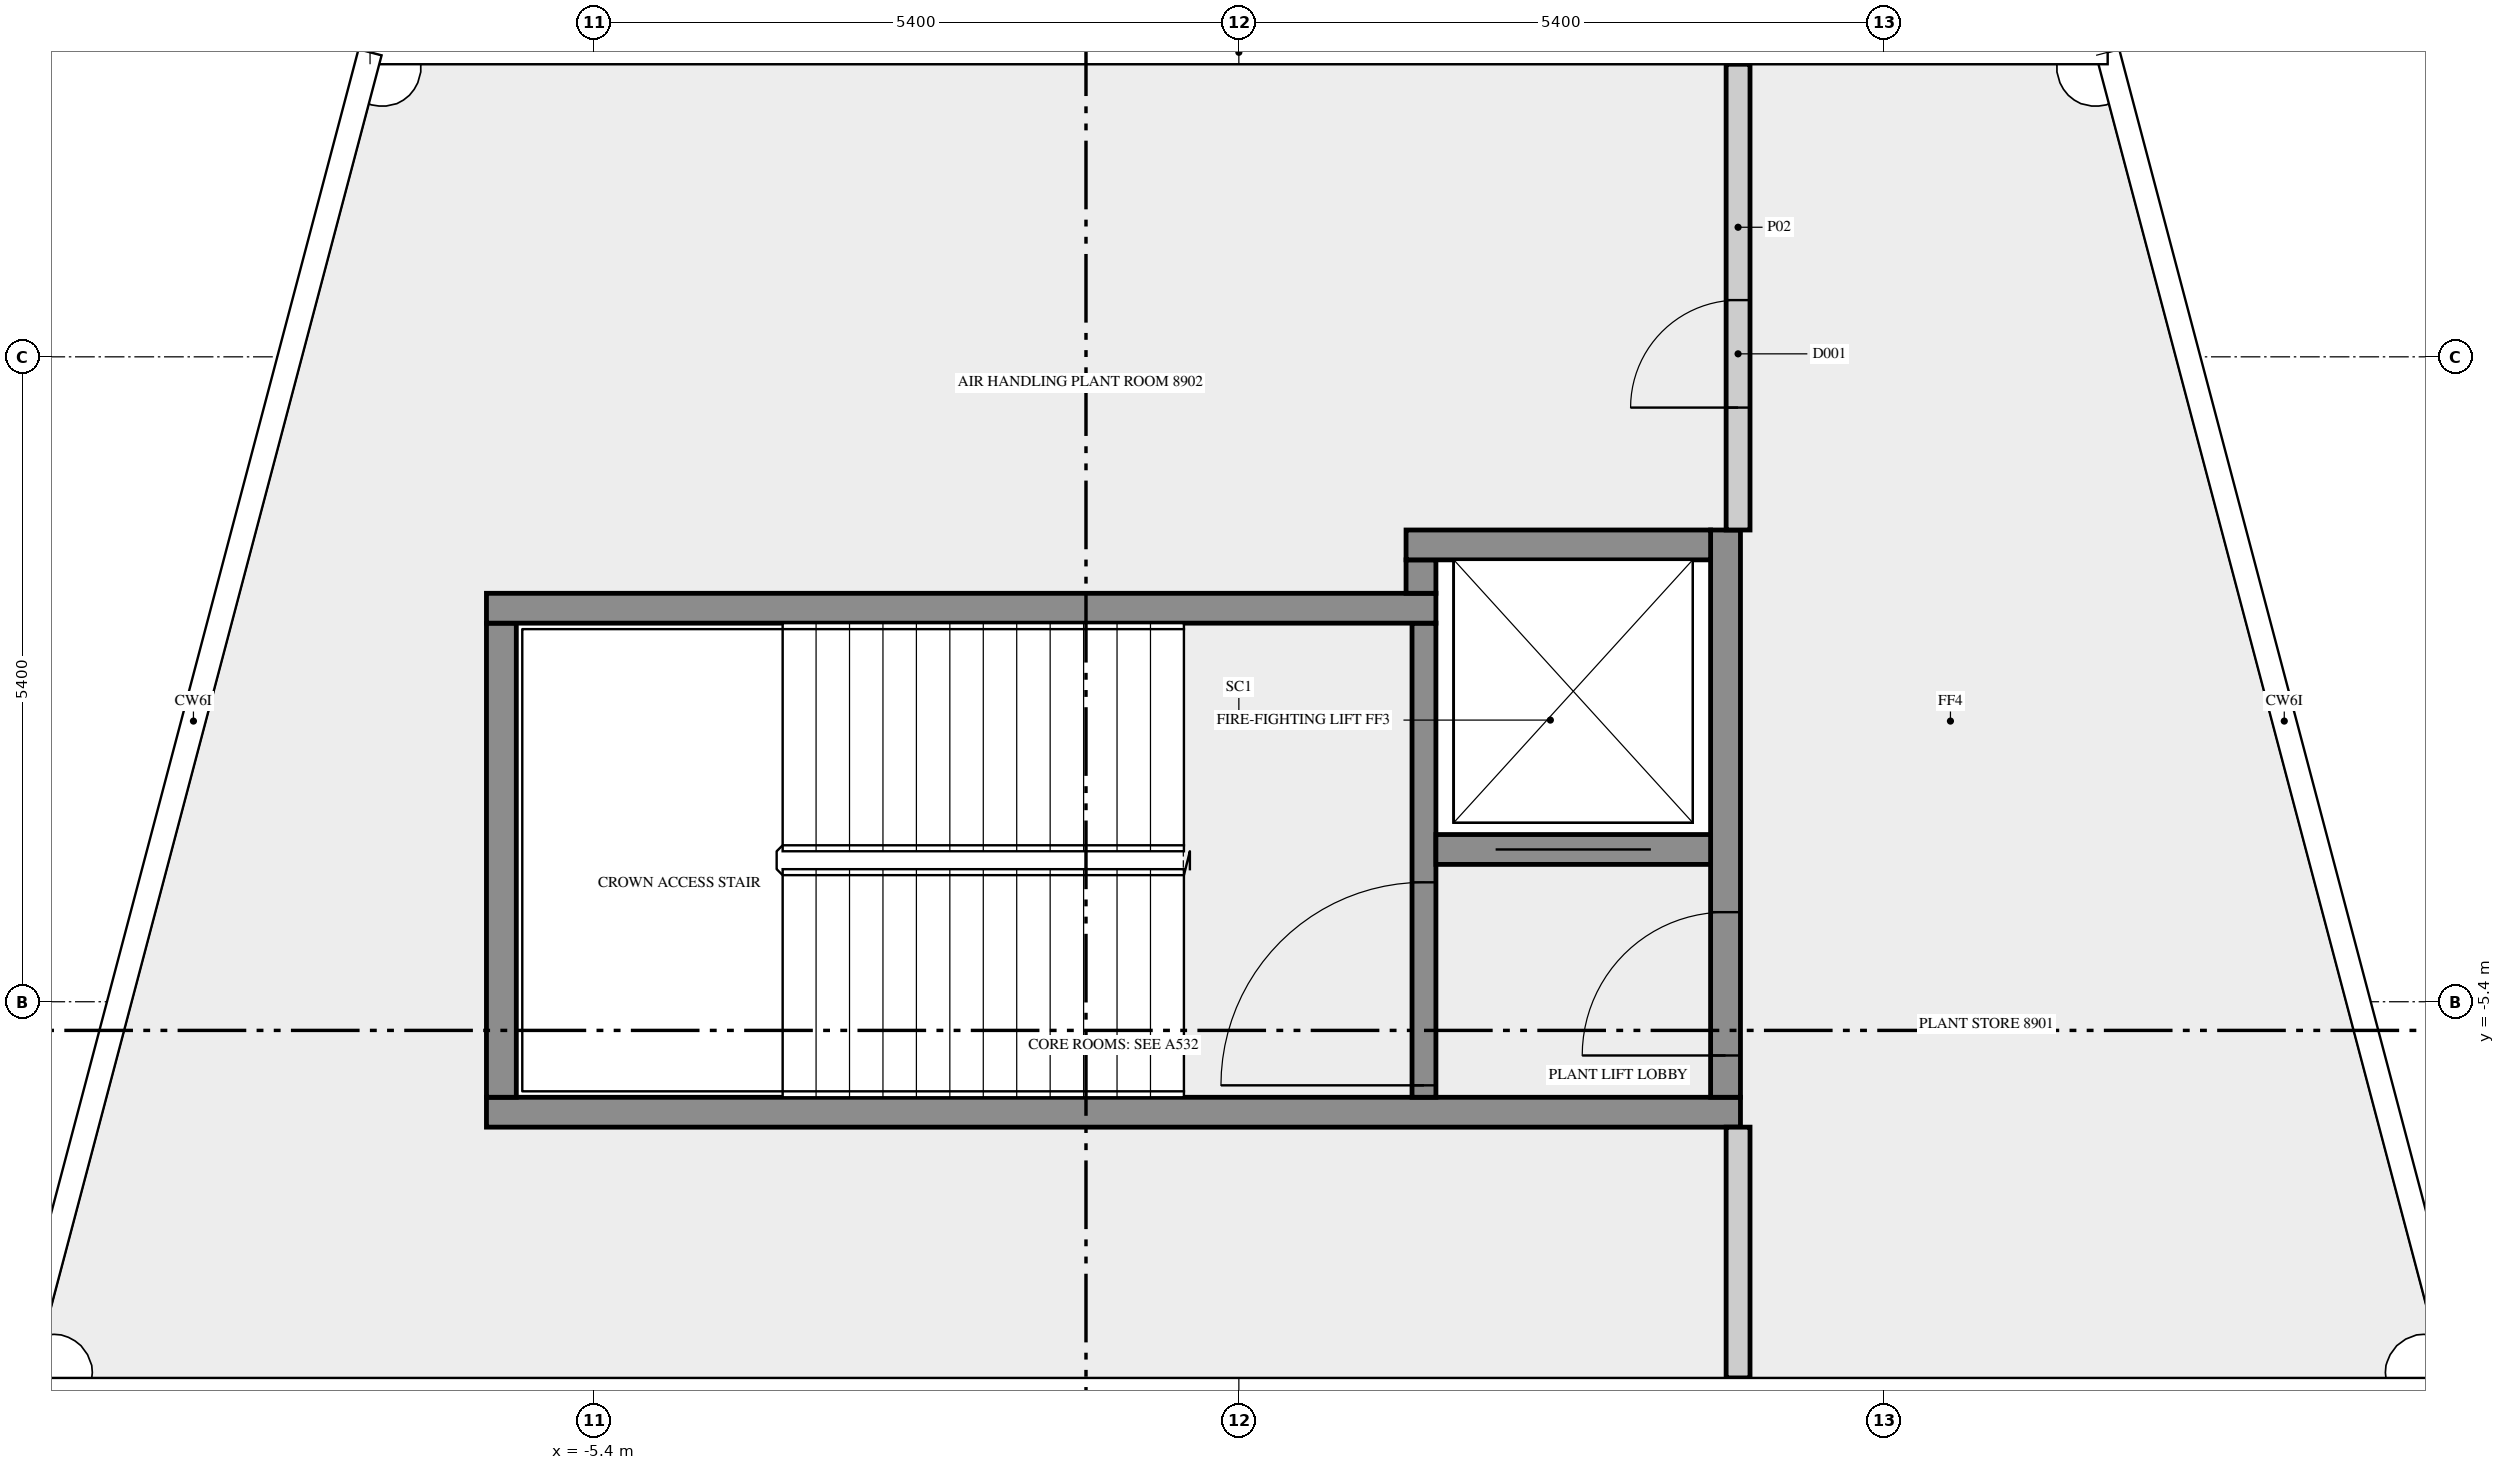
"""IFC4 building model, lengths in metres.
Left out: names, types, materials, properties, quantities, classifications, styles, units other than length and angle.
Written with IfcOpenShell. Run it as: python <this file> out.ifc"""

import sys

from ifc_helpers import new_model, si_unit, direction, frame, frame_2d, origin, place, context, subcontext, project, spatial, rectangle, extrude, element, fill, save


model = new_model("IFC4")
c1 = context("Model", 3, precision=1e-05, world=origin(), true_north=direction((0.0, 1.0)))
c2 = subcontext(c1, "Body", "Model", "MODEL_VIEW")
j1 = project(units=[si_unit("LENGTHUNIT", "METRE"), si_unit("PLANEANGLEUNIT", "RADIAN")], contexts=[c1])
p1 = place(None, origin())
s1 = spatial("IfcSite", under=j1, at=p1, CompositionType="ELEMENT")
p2 = place(p1, origin())
s2 = spatial("IfcBuilding", under=s1, at=p2, CompositionType="ELEMENT")
p3 = place(p2, frame((0.0, 0.0, 384.0)))
s3 = spatial("IfcBuildingStorey", under=s2, at=p3, CompositionType="ELEMENT", Elevation=384.0)
p4 = place(p3, frame((-6.3, -6.325, 0.0), z_axis=(0.0, 0.0, 1.0), x_axis=(1.0, 0.0, 0.0)))
e1 = element("IfcWall", 1, at=p4, inside=s3, PredefinedType="SHEAR", context=c2, shape_type="SweptSolid", body=[
    extrude(rectangle(XDim=10.5, YDim=0.25, at=frame_2d((5.25, 0.0))), origin(), (0.0, 0.0, 1.0), 3.75),
])
p5 = place(p3, frame((-6.175, -6.2, 0.0), z_axis=(0.0, 0.0, 1.0), x_axis=(0.0, 1.0, 0.0)))
e2 = element("IfcWall", 2, at=p5, inside=s3, PredefinedType="SHEAR", context=c2, shape_type="SweptSolid", body=[
    extrude(rectangle(XDim=3.97, YDim=0.25, at=frame_2d((1.985, 0.0))), origin(), (0.0, 0.0, 1.0), 3.75),
])
p6 = place(p3, frame((1.55, -6.2, 0.0), z_axis=(0.0, 0.0, 1.0), x_axis=(0.0, 1.0, 0.0)))
e3 = element("IfcWall", 3, at=p6, inside=s3, PredefinedType="SHEAR", context=c2, shape_type="SweptSolid", body=[
    extrude(rectangle(XDim=3.97, YDim=0.2, at=frame_2d((1.985, 0.0))), origin(), (0.0, 0.0, 1.0), 3.75),
])
p7 = place(p6, frame((0.1, 0.0, 0.0)))
e4 = element("IfcOpeningElement", 4, at=p7, cuts=e3, PredefinedType="OPENING", context=c2, shape_type="SweptSolid", body=[
    extrude(rectangle(XDim=1.7, YDim=2.1, at=frame_2d((0.85, 1.05))), frame((0.0, 0.11, 0.0), z_axis=(0.0, -1.0, 0.0), x_axis=(1.0, 0.0, 0.0)), (0.0, 0.0, 1.0), 0.22),
])
p8 = place(p3, frame((4.075, -6.2, 0.0), z_axis=(0.0, 0.0, 1.0), x_axis=(0.0, 1.0, 0.0)))
e5 = element("IfcWall", 5, at=p8, inside=s3, PredefinedType="SHEAR", context=c2, shape_type="SweptSolid", body=[
    extrude(rectangle(XDim=4.75, YDim=0.25, at=frame_2d((2.375, 0.0))), origin(), (0.0, 0.0, 1.0), 3.75),
])
p9 = place(p8, frame((0.35, 0.0, 0.0)))
e6 = element("IfcOpeningElement", 6, at=p9, cuts=e5, PredefinedType="OPENING", context=c2, shape_type="SweptSolid", body=[
    extrude(rectangle(XDim=1.2, YDim=2.1, at=frame_2d((0.6, 1.05))), frame((0.0, 0.135, 0.0), z_axis=(0.0, -1.0, 0.0), x_axis=(1.0, 0.0, 0.0)), (0.0, 0.0, 1.0), 0.27),
])
p10 = place(p3, frame((1.65, -4.125, 0.0), z_axis=(0.0, 0.0, 1.0), x_axis=(1.0, 0.0, 0.0)))
e7 = element("IfcWall", 7, at=p10, inside=s3, PredefinedType="SHEAR", context=c2, shape_type="SweptSolid", body=[
    extrude(rectangle(XDim=2.3, YDim=0.25, at=frame_2d((1.15, 0.0))), origin(), (0.0, 0.0, 1.0), 3.75),
])
p11 = place(p10, frame((0.5, 0.0, 0.0)))
e8 = element("IfcOpeningElement", 8, at=p11, cuts=e7, PredefinedType="OPENING", context=c2, shape_type="SweptSolid", body=[
    extrude(rectangle(XDim=1.3, YDim=2.1, at=frame_2d((0.65, 1.05))), frame((0.0, 0.135, 0.0), z_axis=(0.0, -1.0, 0.0), x_axis=(1.0, 0.0, 0.0)), (0.0, 0.0, 1.0), 0.27),
])
p12 = place(p3, frame((-6.3, -2.105, 0.0), z_axis=(0.0, 0.0, 1.0), x_axis=(1.0, 0.0, 0.0)))
e9 = element("IfcWall", 9, at=p12, inside=s3, PredefinedType="SHEAR", context=c2, shape_type="SweptSolid", body=[
    extrude(rectangle(XDim=7.95, YDim=0.25, at=frame_2d((3.975, 0.0))), origin(), (0.0, 0.0, 1.0), 3.75),
])
p13 = place(p3, frame((1.525, -1.98, 0.0), z_axis=(0.0, 0.0, 1.0), x_axis=(0.0, 1.0, 0.0)))
e10 = element("IfcWall", 10, at=p13, inside=s3, PredefinedType="SHEAR", context=c2, shape_type="SweptSolid", body=[
    extrude(rectangle(XDim=0.28, YDim=0.25, at=frame_2d((0.14, 0.0))), origin(), (0.0, 0.0, 1.0), 3.75),
])
p14 = place(p3, frame((1.4, -1.575, 0.0), z_axis=(0.0, 0.0, 1.0), x_axis=(1.0, 0.0, 0.0)))
e11 = element("IfcWall", 11, at=p14, inside=s3, PredefinedType="SHEAR", context=c2, shape_type="SweptSolid", body=[
    extrude(rectangle(XDim=2.55, YDim=0.25, at=frame_2d((1.275, 0.0))), origin(), (0.0, 0.0, 1.0), 3.75),
])
p15 = place(p3, frame((4.18, -8.55, 0.0), z_axis=(0.0, 0.0, 1.0), x_axis=(0.0, 1.0, 0.0)))
e12 = element("IfcWall", 12, at=p15, inside=s3, PredefinedType="SOLIDWALL", context=c2, shape_type="SweptSolid", body=[
    extrude(rectangle(XDim=2.1, YDim=0.2, at=frame_2d((1.05, 0.0))), origin(), (0.0, 0.0, 1.0), 2.838),
])
p16 = place(p3, frame((4.18, -1.45, 0.0), z_axis=(0.0, 0.0, 1.0), x_axis=(0.0, 1.0, 0.0)))
e13 = element("IfcWall", 13, at=p16, inside=s3, PredefinedType="SOLIDWALL", context=c2, shape_type="SweptSolid", body=[
    extrude(rectangle(XDim=3.9, YDim=0.2, at=frame_2d((1.95, 0.0))), origin(), (0.0, 0.0, 1.0), 2.838),
])
p17 = place(p16, frame((1.025, 0.0, 0.0)))
e14 = element("IfcOpeningElement", 14, at=p17, cuts=e13, PredefinedType="OPENING", context=c2, shape_type="SweptSolid", body=[
    extrude(rectangle(XDim=0.9, YDim=2.1, at=frame_2d((0.45, 1.05))), frame((0.0, 0.11, 0.0), z_axis=(0.0, -1.0, 0.0), x_axis=(1.0, 0.0, 0.0)), (0.0, 0.0, 1.0), 0.22),
])
p18 = place(p7, origin())
e15 = element("IfcDoor", 15, at=p18, inside=s3, OperationType="DOUBLE_DOOR_SINGLE_SWING", PredefinedType="DOOR", context=c2, shape_type="SweptSolid", body=[
    extrude(rectangle(XDim=1.7, YDim=2.1, at=frame_2d((0.85, 1.05))), frame((0.0, 0.025, 0.0), z_axis=(0.0, -1.0, 0.0), x_axis=(1.0, 0.0, 0.0)), (0.0, 0.0, 1.0), 0.05),
])
fill(e4, e15)
p19 = place(p9, origin())
e16 = element("IfcDoor", 16, at=p19, inside=s3, OperationType="SINGLE_SWING_LEFT", PredefinedType="DOOR", context=c2, shape_type="SweptSolid", body=[
    extrude(rectangle(XDim=1.2, YDim=2.1, at=frame_2d((0.6, 1.05))), frame((0.0, 0.025, 0.0), z_axis=(0.0, -1.0, 0.0), x_axis=(1.0, 0.0, 0.0)), (0.0, 0.0, 1.0), 0.05),
])
fill(e6, e16)
p20 = place(p11, origin())
e17 = element("IfcDoor", 17, at=p20, inside=s3, OperationType="DOUBLE_DOOR_SLIDING", PredefinedType="DOOR", context=c2, shape_type="SweptSolid", body=[
    extrude(rectangle(XDim=1.3, YDim=2.1, at=frame_2d((0.65, 1.05))), frame((0.0, 0.025, 0.0), z_axis=(0.0, -1.0, 0.0), x_axis=(1.0, 0.0, 0.0)), (0.0, 0.0, 1.0), 0.05),
])
fill(e8, e17)
p21 = place(p17, origin())
e18 = element("IfcDoor", 18, at=p21, inside=s3, OperationType="SINGLE_SWING_RIGHT", PredefinedType="DOOR", context=c2, shape_type="SweptSolid", body=[
    extrude(rectangle(XDim=0.9, YDim=2.1, at=frame_2d((0.45, 1.05))), frame((0.0, 0.025, 0.0), z_axis=(0.0, -1.0, 0.0), x_axis=(1.0, 0.0, 0.0)), (0.0, 0.0, 1.0), 0.05),
])
fill(e14, e18)
save(model, sys.argv[1])
